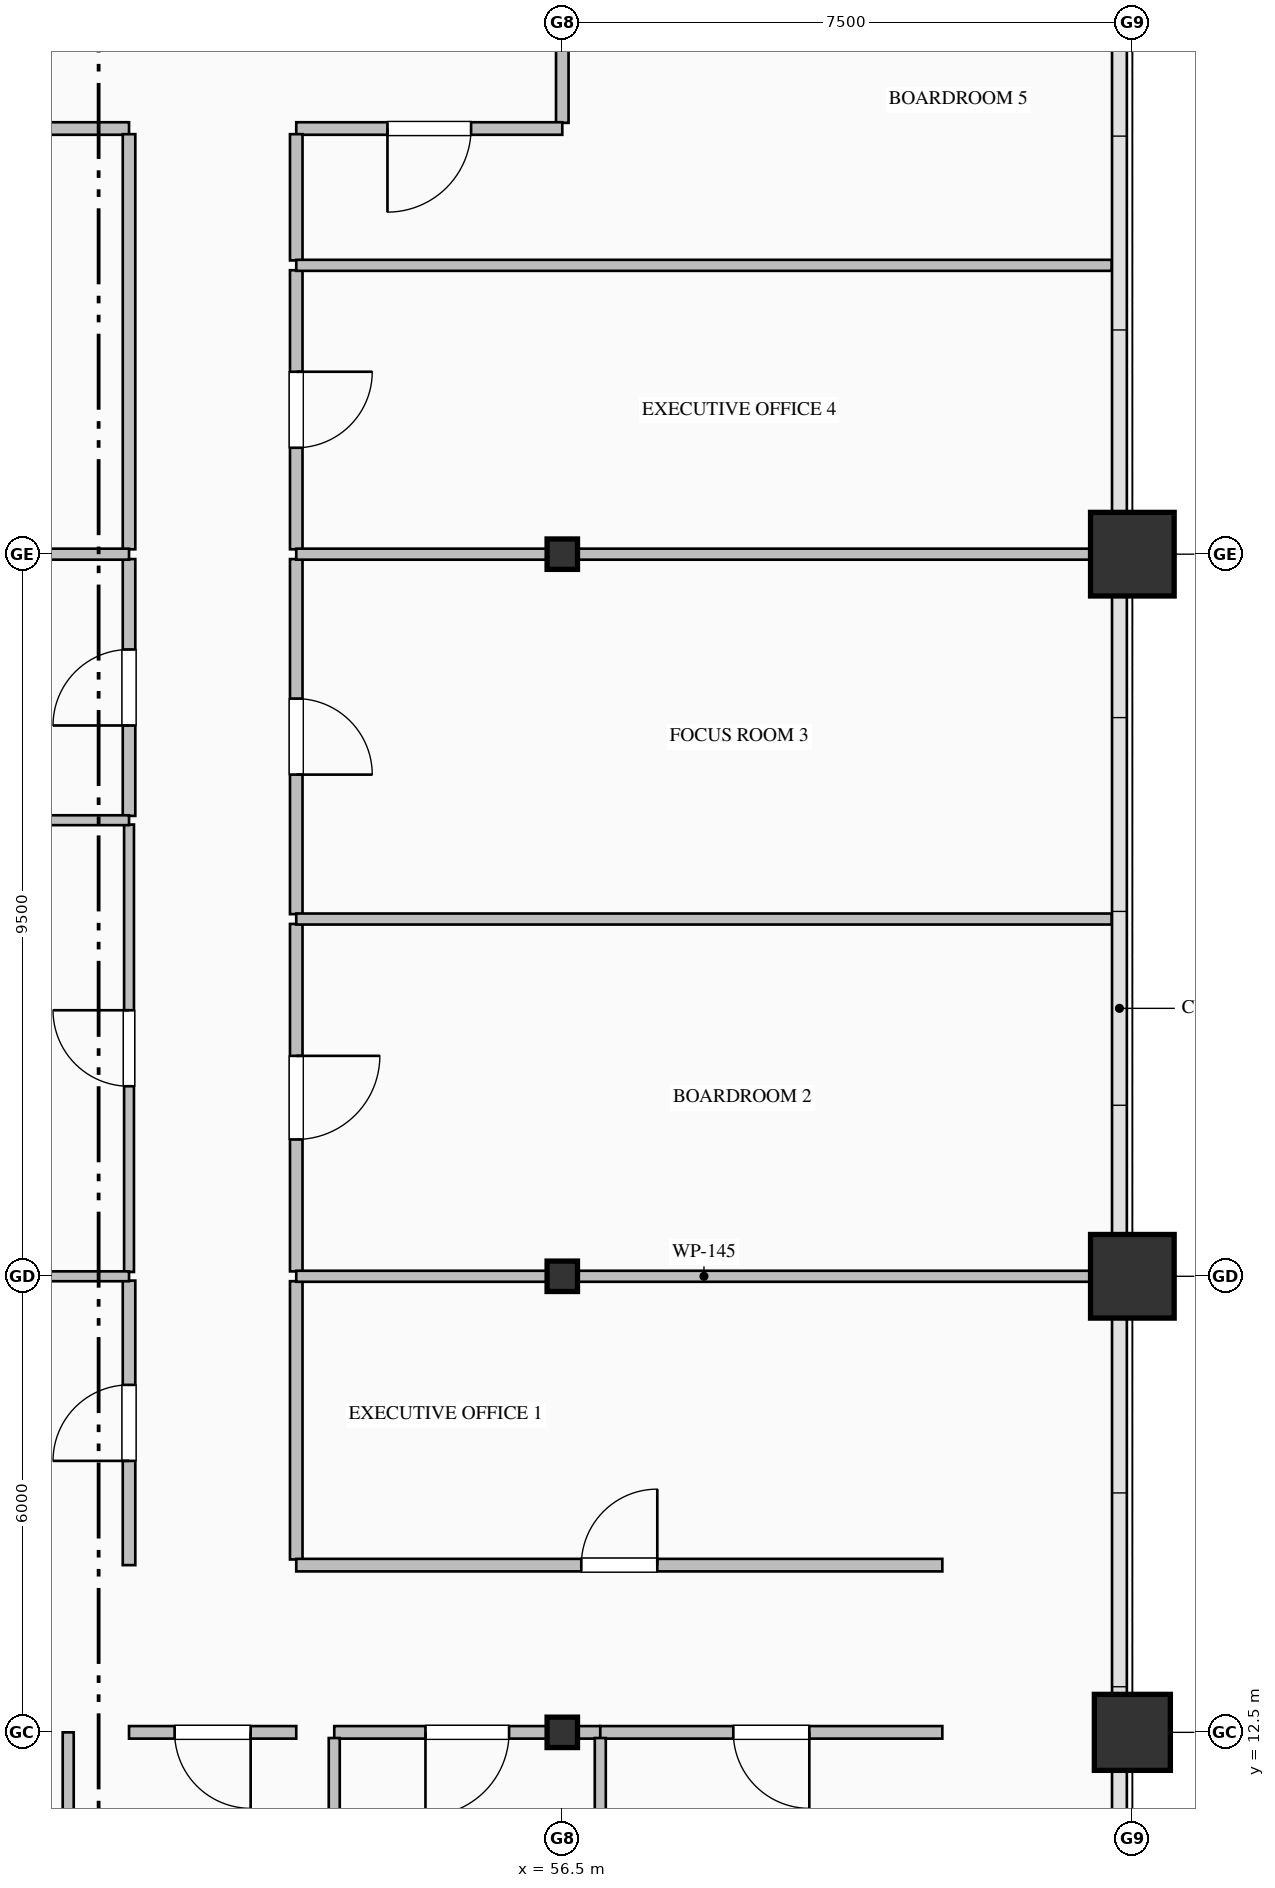
"""IFC4 building model, lengths in metres.
Left out: names, types, materials, properties, quantities, classifications, styles, units other than length and angle.
Written with IfcOpenShell. Run it as: python <this file> out.ifc"""

import sys

from ifc_helpers import new_model, si_unit, direction, frame, frame_2d, origin, origin_2d, place, context, subcontext, project, spatial, rectangle, hollow_rectangle, hollow_circle, i_section, extrude, element, fill, save


model = new_model("IFC4")
c1 = context("Model", 3, precision=1e-05, world=origin(), true_north=direction((0.0, 1.0)))
c2 = subcontext(c1, "Body", "Model", "MODEL_VIEW")
j1 = project(units=[si_unit("LENGTHUNIT", "METRE"), si_unit("PLANEANGLEUNIT", "RADIAN")], contexts=[c1])
p1 = place(None, origin())
s1 = spatial("IfcSite", under=j1, at=p1, CompositionType="ELEMENT")
p2 = place(p1, origin())
s2 = spatial("IfcBuilding", under=s1, at=p2, CompositionType="ELEMENT")
p3 = place(p2, frame((0.0, 0.0, 119.0)))
s3 = spatial("IfcBuildingStorey", under=s2, at=p3, CompositionType="ELEMENT", Elevation=119.0)
for number, where, z_axis, x_axis in (
    (1, (56.5, 12.5, 0.0), (0.0, 0.0, 1.0), (1.0, 0.0, 0.0)),
    (2, (56.5, 18.5, 0.0), (0.0, 0.0, 1.0), (1.0, 0.0, 0.0)),
    (3, (56.5, 28.0, 0.0), (0.0, 0.0, 1.0), (1.0, 0.0, 0.0)),
):
    element("IfcColumn", number, at=place(p3, frame(where, z_axis=z_axis, x_axis=x_axis)), inside=s3, PredefinedType="COLUMN", context=c2, shape_type="SweptSolid", body=[
        extrude(i_section(OverallWidth=0.4, OverallDepth=0.4, WebThickness=0.013, FlangeThickness=0.021, FilletRadius=0.022, at=origin_2d()), origin(), (0.0, 0.0, 1.0), 4.0),
    ])
p4 = place(p3, frame((64.0, 12.5, 0.0), z_axis=(0.0, 0.0, 1.0), x_axis=(1.0, 0.0, 0.0)))
e4 = element("IfcColumn", 4, at=p4, inside=s3, PredefinedType="COLUMN", context=c2, shape_type="SweptSolid", body=[
    extrude(hollow_circle(Radius=0.5, WallThickness=0.036, at=origin_2d()), origin(), (0.0, 0.0, 1.0), 4.0),
])
for number, where, z_axis, x_axis in (
    (5, (64.0, 18.5, 0.0), (0.0, 0.0, 1.0), (1.0, 0.0, 0.0)),
    (6, (64.0, 28.0, 0.0), (0.0, 0.0, 1.0), (1.0, 0.0, 0.0)),
):
    element("IfcColumn", number, at=place(p3, frame(where, z_axis=z_axis, x_axis=x_axis)), inside=s3, PredefinedType="COLUMN", context=c2, shape_type="SweptSolid", body=[
        extrude(hollow_rectangle(XDim=1.1, YDim=1.1, WallThickness=0.04, at=origin_2d()), origin(), (0.0, 0.0, 1.0), 4.0),
    ])
p5 = place(p3, frame((56.5, 36.0, 0.0), z_axis=(0.0, 0.0, 1.0), x_axis=(0.0, -1.0, 0.0)))
e7 = element("IfcWall", 7, at=p5, inside=s3, PredefinedType="PARTITIONING", context=c2, shape_type="SweptSolid", body=[
    extrude(rectangle(XDim=2.325, YDim=0.165, at=frame_2d((1.163, 0.0))), origin(), (0.0, 0.0, 1.0), 3.157),
])
p6 = place(p3, frame((56.5, 33.6, 0.0), z_axis=(0.0, 0.0, 1.0), x_axis=(-1.0, 0.0, 0.0)))
e8 = element("IfcWall", 8, at=p6, inside=s3, PredefinedType="PARTITIONING", context=c2, shape_type="SweptSolid", body=[
    extrude(rectangle(XDim=3.5, YDim=0.165, at=frame_2d((1.75, 0.0))), origin(), (0.0, 0.0, 1.0), 3.765),
])
p7 = place(p6, frame((1.2, 0.0, 0.0)))
e9 = element("IfcOpeningElement", 9, at=p7, cuts=e8, PredefinedType="OPENING", context=c2, shape_type="SweptSolid", body=[
    extrude(rectangle(XDim=1.1, YDim=2.2, at=frame_2d((0.55, 1.1))), frame((0.0, 0.093, 0.0), z_axis=(0.0, -1.0, 0.0), x_axis=(1.0, 0.0, 0.0)), (0.0, 0.0, 1.0), 0.185),
])
p8 = place(p3, frame((50.8, 33.6, 0.0), z_axis=(0.0, 0.0, 1.0), x_axis=(-1.0, 0.0, 0.0)))
e10 = element("IfcWall", 10, at=p8, inside=s3, PredefinedType="PARTITIONING", context=c2, shape_type="SweptSolid", body=[
    extrude(rectangle(XDim=10.3, YDim=0.165, at=frame_2d((5.15, 0.0))), origin(), (0.0, 0.0, 1.0), 3.765),
])
p9 = place(p8, frame((4.65, 0.0, 0.0)))
e11 = element("IfcOpeningElement", 11, at=p9, cuts=e10, PredefinedType="OPENING", context=c2, shape_type="SweptSolid", body=[
    extrude(rectangle(XDim=1.0, YDim=2.15, at=frame_2d((0.5, 1.075))), frame((0.0, 0.093, 0.0), z_axis=(0.0, -1.0, 0.0), x_axis=(1.0, 0.0, 0.0)), (0.0, 0.0, 1.0), 0.185),
])
p10 = place(p3, frame((53.0, 18.436, 0.0), z_axis=(0.0, 0.0, 1.0), x_axis=(0.0, -1.0, 0.0)))
e12 = element("IfcWall", 12, at=p10, inside=s3, PredefinedType="PARTITIONING", context=c2, shape_type="SweptSolid", body=[
    extrude(rectangle(XDim=3.661, YDim=0.165, at=frame_2d((1.831, 0.0))), origin(), (0.0, 0.0, 1.0), 3.765),
])
p11 = place(p3, frame((53.0, 23.135, 0.0), z_axis=(0.0, 0.0, 1.0), x_axis=(0.0, -1.0, 0.0)))
e13 = element("IfcWall", 13, at=p11, inside=s3, PredefinedType="PARTITIONING", context=c2, shape_type="SweptSolid", body=[
    extrude(rectangle(XDim=4.571, YDim=0.165, at=frame_2d((2.286, 0.0))), origin(), (0.0, 0.0, 1.0), 3.765),
])
p12 = place(p11, frame((1.736, 0.0, 0.0)))
e14 = element("IfcOpeningElement", 14, at=p12, cuts=e13, PredefinedType="OPENING", context=c2, shape_type="SweptSolid", body=[
    extrude(rectangle(XDim=1.1, YDim=2.2, at=frame_2d((0.55, 1.1))), frame((0.0, 0.093, 0.0), z_axis=(0.0, -1.0, 0.0), x_axis=(1.0, 0.0, 0.0)), (0.0, 0.0, 1.0), 0.185),
])
p13 = place(p3, frame((53.0, 27.936, 0.0), z_axis=(0.0, 0.0, 1.0), x_axis=(0.0, -1.0, 0.0)))
e15 = element("IfcWall", 15, at=p13, inside=s3, PredefinedType="PARTITIONING", context=c2, shape_type="SweptSolid", body=[
    extrude(rectangle(XDim=4.671, YDim=0.165, at=frame_2d((2.335, 0.0))), origin(), (0.0, 0.0, 1.0), 3.765),
])
p14 = place(p13, frame((1.835, 0.0, 0.0)))
e16 = element("IfcOpeningElement", 16, at=p14, cuts=e15, PredefinedType="OPENING", context=c2, shape_type="SweptSolid", body=[
    extrude(rectangle(XDim=1.0, YDim=2.15, at=frame_2d((0.5, 1.075))), frame((0.0, 0.093, 0.0), z_axis=(0.0, -1.0, 0.0), x_axis=(1.0, 0.0, 0.0)), (0.0, 0.0, 1.0), 0.185),
])
p15 = place(p3, frame((53.0, 31.736, 0.0), z_axis=(0.0, 0.0, 1.0), x_axis=(0.0, -1.0, 0.0)))
e17 = element("IfcWall", 17, at=p15, inside=s3, PredefinedType="PARTITIONING", context=c2, shape_type="SweptSolid", body=[
    extrude(rectangle(XDim=3.671, YDim=0.165, at=frame_2d((1.835, 0.0))), origin(), (0.0, 0.0, 1.0), 3.765),
])
p16 = place(p15, frame((1.335, 0.0, 0.0)))
e18 = element("IfcOpeningElement", 18, at=p16, cuts=e17, PredefinedType="OPENING", context=c2, shape_type="SweptSolid", body=[
    extrude(rectangle(XDim=1.0, YDim=2.15, at=frame_2d((0.5, 1.075))), frame((0.0, 0.093, 0.0), z_axis=(0.0, -1.0, 0.0), x_axis=(1.0, 0.0, 0.0)), (0.0, 0.0, 1.0), 0.185),
])
p17 = place(p3, frame((53.0, 33.525, 0.0), z_axis=(0.0, 0.0, 1.0), x_axis=(0.0, -1.0, 0.0)))
e19 = element("IfcWall", 19, at=p17, inside=s3, PredefinedType="PARTITIONING", context=c2, shape_type="SweptSolid", body=[
    extrude(rectangle(XDim=1.661, YDim=0.165, at=frame_2d((0.831, 0.0))), origin(), (0.0, 0.0, 1.0), 3.765),
])
p18 = place(p3, frame((50.8, 14.7, 0.0), z_axis=(0.0, 0.0, 1.0), x_axis=(0.0, 1.0, 0.0)))
e20 = element("IfcWall", 20, at=p18, inside=s3, PredefinedType="PARTITIONING", context=c2, shape_type="SweptSolid", body=[
    extrude(rectangle(XDim=3.743, YDim=0.165, at=frame_2d((1.872, 0.0))), origin(), (0.0, 0.0, 1.0), 3.765),
])
p19 = place(p18, frame((1.372, 0.0, 0.0)))
e21 = element("IfcOpeningElement", 21, at=p19, cuts=e20, PredefinedType="OPENING", context=c2, shape_type="SweptSolid", body=[
    extrude(rectangle(XDim=1.0, YDim=2.15, at=frame_2d((0.5, 1.075))), frame((0.0, 0.093, 0.0), z_axis=(0.0, -1.0, 0.0), x_axis=(1.0, 0.0, 0.0)), (0.0, 0.0, 1.0), 0.185),
])
p20 = place(p3, frame((50.8, 18.557, 0.0), z_axis=(0.0, 0.0, 1.0), x_axis=(0.0, 1.0, 0.0)))
e22 = element("IfcWall", 22, at=p20, inside=s3, PredefinedType="PARTITIONING", context=c2, shape_type="SweptSolid", body=[
    extrude(rectangle(XDim=5.886, YDim=0.13, at=frame_2d((2.943, 0.0))), origin(), (0.0, 0.0, 1.0), 3.765),
])
p21 = place(p20, frame((2.443, 0.0, 0.0)))
e23 = element("IfcOpeningElement", 23, at=p21, cuts=e22, PredefinedType="OPENING", context=c2, shape_type="SweptSolid", body=[
    extrude(rectangle(XDim=1.0, YDim=2.15, at=frame_2d((0.5, 1.075))), frame((0.0, 0.075, 0.0), z_axis=(0.0, -1.0, 0.0), x_axis=(1.0, 0.0, 0.0)), (0.0, 0.0, 1.0), 0.15),
])
p22 = place(p3, frame((50.8, 24.557, 0.0), z_axis=(0.0, 0.0, 1.0), x_axis=(0.0, 1.0, 0.0)))
e24 = element("IfcWall", 24, at=p22, inside=s3, PredefinedType="PARTITIONING", context=c2, shape_type="SweptSolid", body=[
    extrude(rectangle(XDim=3.379, YDim=0.165, at=frame_2d((1.689, 0.0))), origin(), (0.0, 0.0, 1.0), 3.765),
])
p23 = place(p22, frame((1.189, 0.0, 0.0)))
e25 = element("IfcOpeningElement", 25, at=p23, cuts=e24, PredefinedType="OPENING", context=c2, shape_type="SweptSolid", body=[
    extrude(rectangle(XDim=1.0, YDim=2.15, at=frame_2d((0.5, 1.075))), frame((0.0, 0.093, 0.0), z_axis=(0.0, -1.0, 0.0), x_axis=(1.0, 0.0, 0.0)), (0.0, 0.0, 1.0), 0.185),
])
p24 = place(p3, frame((50.8, 28.064, 0.0), z_axis=(0.0, 0.0, 1.0), x_axis=(0.0, 1.0, 0.0)))
e26 = element("IfcWall", 26, at=p24, inside=s3, PredefinedType="PARTITIONING", context=c2, shape_type="SweptSolid", body=[
    extrude(rectangle(XDim=5.461, YDim=0.165, at=frame_2d((2.73, 0.0))), origin(), (0.0, 0.0, 1.0), 3.765),
])
p25 = place(p3, frame((53.0, 12.5, 0.0), z_axis=(0.0, 0.0, 1.0), x_axis=(-1.0, 0.0, 0.0)))
e27 = element("IfcWall", 27, at=p25, inside=s3, PredefinedType="PARTITIONING", context=c2, shape_type="SweptSolid", body=[
    extrude(rectangle(XDim=2.2, YDim=0.165, at=frame_2d((1.1, 0.0))), origin(), (0.0, 0.0, 1.0), 3.157),
])
p26 = place(p25, frame((0.6, 0.0, 0.0)))
e28 = element("IfcOpeningElement", 28, at=p26, cuts=e27, PredefinedType="OPENING", context=c2, shape_type="SweptSolid", body=[
    extrude(rectangle(XDim=1.0, YDim=2.15, at=frame_2d((0.5, 1.075))), frame((0.0, 0.093, 0.0), z_axis=(0.0, -1.0, 0.0), x_axis=(1.0, 0.0, 0.0)), (0.0, 0.0, 1.0), 0.185),
])
p27 = place(p3, frame((53.0, 14.7, 0.0), z_axis=(0.0, 0.0, 1.0), x_axis=(1.0, 0.0, 0.0)))
e29 = element("IfcWall", 29, at=p27, inside=s3, PredefinedType="PARTITIONING", context=c2, shape_type="SweptSolid", body=[
    extrude(rectangle(XDim=8.5, YDim=0.165, at=frame_2d((4.25, 0.0))), origin(), (0.0, 0.0, 1.0), 3.765),
])
p28 = place(p27, frame((3.75, 0.0, 0.0)))
e30 = element("IfcOpeningElement", 30, at=p28, cuts=e29, PredefinedType="OPENING", context=c2, shape_type="SweptSolid", body=[
    extrude(rectangle(XDim=1.0, YDim=2.15, at=frame_2d((0.5, 1.075))), frame((0.0, 0.093, 0.0), z_axis=(0.0, -1.0, 0.0), x_axis=(1.0, 0.0, 0.0)), (0.0, 0.0, 1.0), 0.185),
])
p29 = place(p3, frame((57.0, 12.5, 0.0), z_axis=(0.0, 0.0, 1.0), x_axis=(-1.0, 0.0, 0.0)))
e31 = element("IfcWall", 31, at=p29, inside=s3, PredefinedType="PARTITIONING", context=c2, shape_type="SweptSolid", body=[
    extrude(rectangle(XDim=3.5, YDim=0.165, at=frame_2d((1.75, 0.0))), origin(), (0.0, 0.0, 1.0), 3.157),
])
p30 = place(p29, frame((1.2, 0.0, 0.0)))
e32 = element("IfcOpeningElement", 32, at=p30, cuts=e31, PredefinedType="OPENING", context=c2, shape_type="SweptSolid", body=[
    extrude(rectangle(XDim=1.1, YDim=2.2, at=frame_2d((0.55, 1.1))), frame((0.0, 0.093, 0.0), z_axis=(0.0, -1.0, 0.0), x_axis=(1.0, 0.0, 0.0)), (0.0, 0.0, 1.0), 0.185),
])
p31 = place(p3, frame((61.5, 12.5, 0.0), z_axis=(0.0, 0.0, 1.0), x_axis=(-1.0, 0.0, 0.0)))
e33 = element("IfcWall", 33, at=p31, inside=s3, PredefinedType="PARTITIONING", context=c2, shape_type="SweptSolid", body=[
    extrude(rectangle(XDim=4.5, YDim=0.165, at=frame_2d((2.25, 0.0))), origin(), (0.0, 0.0, 1.0), 3.157),
])
p32 = place(p31, frame((1.75, 0.0, 0.0)))
e34 = element("IfcOpeningElement", 34, at=p32, cuts=e33, PredefinedType="OPENING", context=c2, shape_type="SweptSolid", body=[
    extrude(rectangle(XDim=1.0, YDim=2.15, at=frame_2d((0.5, 1.075))), frame((0.0, 0.093, 0.0), z_axis=(0.0, -1.0, 0.0), x_axis=(1.0, 0.0, 0.0)), (0.0, 0.0, 1.0), 0.185),
])
p33 = place(p3, frame((53.0, 18.5, 0.0), z_axis=(0.0, 0.0, 1.0), x_axis=(1.0, 0.0, 0.0)))
e35 = element("IfcWall", 35, at=p33, inside=s3, PredefinedType="PARTITIONING", context=c2, shape_type="SweptSolid", body=[
    extrude(rectangle(XDim=10.728, YDim=0.145, at=frame_2d((5.364, 0.0))), origin(), (0.0, 0.0, 1.0), 3.157),
])
p34 = place(p3, frame((53.0, 23.2, 0.0), z_axis=(0.0, 0.0, 1.0), x_axis=(1.0, 0.0, 0.0)))
e36 = element("IfcWall", 36, at=p34, inside=s3, PredefinedType="PARTITIONING", context=c2, shape_type="SweptSolid", body=[
    extrude(rectangle(XDim=10.728, YDim=0.145, at=frame_2d((5.364, 0.0))), origin(), (0.0, 0.0, 1.0), 3.407),
])
p35 = place(p3, frame((53.0, 28.0, 0.0), z_axis=(0.0, 0.0, 1.0), x_axis=(1.0, 0.0, 0.0)))
e37 = element("IfcWall", 37, at=p35, inside=s3, PredefinedType="PARTITIONING", context=c2, shape_type="SweptSolid", body=[
    extrude(rectangle(XDim=10.728, YDim=0.145, at=frame_2d((5.364, 0.0))), origin(), (0.0, 0.0, 1.0), 3.157),
])
p36 = place(p3, frame((53.0, 31.8, 0.0), z_axis=(0.0, 0.0, 1.0), x_axis=(1.0, 0.0, 0.0)))
e38 = element("IfcWall", 38, at=p36, inside=s3, PredefinedType="PARTITIONING", context=c2, shape_type="SweptSolid", body=[
    extrude(rectangle(XDim=10.728, YDim=0.145, at=frame_2d((5.364, 0.0))), origin(), (0.0, 0.0, 1.0), 3.765),
])
p37 = place(p3, frame((40.832, 18.5, 0.0), z_axis=(0.0, 0.0, 1.0), x_axis=(1.0, 0.0, 0.0)))
e39 = element("IfcWall", 39, at=p37, inside=s3, PredefinedType="PARTITIONING", context=c2, shape_type="SweptSolid", body=[
    extrude(rectangle(XDim=9.968, YDim=0.13, at=frame_2d((4.984, 0.0))), origin(), (0.0, 0.0, 1.0), 3.157),
])
p38 = place(p3, frame((40.832, 24.5, 0.0), z_axis=(0.0, 0.0, 1.0), x_axis=(1.0, 0.0, 0.0)))
e40 = element("IfcWall", 40, at=p38, inside=s3, PredefinedType="PARTITIONING", context=c2, shape_type="SweptSolid", body=[
    extrude(rectangle(XDim=9.968, YDim=0.13, at=frame_2d((4.984, 0.0))), origin(), (0.0, 0.0, 1.0), 3.765),
])
p39 = place(p3, frame((40.832, 28.0, 0.0), z_axis=(0.0, 0.0, 1.0), x_axis=(1.0, 0.0, 0.0)))
e41 = element("IfcWall", 41, at=p39, inside=s3, PredefinedType="PARTITIONING", context=c2, shape_type="SweptSolid", body=[
    extrude(rectangle(XDim=9.968, YDim=0.145, at=frame_2d((4.984, 0.0))), origin(), (0.0, 0.0, 1.0), 3.157),
])
p40 = place(p3, frame((50.0, 12.5, 0.0), z_axis=(0.0, 0.0, 1.0), x_axis=(0.0, -1.0, 0.0)))
e42 = element("IfcWall", 42, at=p40, inside=s3, PredefinedType="PARTITIONING", context=c2, shape_type="SweptSolid", body=[
    extrude(rectangle(XDim=8.168, YDim=0.145, at=frame_2d((4.084, 0.0))), origin(), (0.0, 0.0, 1.0), 3.765),
])
p41 = place(p40, frame((3.534, 0.0, 0.0)))
e43 = element("IfcOpeningElement", 43, at=p41, cuts=e42, PredefinedType="OPENING", context=c2, shape_type="SweptSolid", body=[
    extrude(rectangle(XDim=1.1, YDim=2.2, at=frame_2d((0.55, 1.1))), frame((0.0, 0.083, 0.0), z_axis=(0.0, -1.0, 0.0), x_axis=(1.0, 0.0, 0.0)), (0.0, 0.0, 1.0), 0.165),
])
for number, where, z_axis, x_axis in (
    (44, (53.5, 12.426, 0.0), (0.0, 0.0, 1.0), (0.0, -1.0, 0.0)),
    (45, (57.0, 12.426, 0.0), (0.0, 0.0, 1.0), (0.0, -1.0, 0.0)),
):
    element("IfcWall", number, at=place(p3, frame(where, z_axis=z_axis, x_axis=x_axis)), inside=s3, PredefinedType="PARTITIONING", context=c2, shape_type="SweptSolid", body=[
        extrude(rectangle(XDim=8.094, YDim=0.145, at=frame_2d((4.047, 0.0))), origin(), (0.0, 0.0, 1.0), 3.765),
    ])
p42 = place(p28, origin())
e46 = element("IfcDoor", 46, at=p42, inside=s3, OperationType="SINGLE_SWING_RIGHT", PredefinedType="DOOR", context=c2, shape_type="SweptSolid", body=[
    extrude(rectangle(XDim=1.0, YDim=2.15, at=frame_2d((0.5, 1.075))), frame((0.0, 0.025, 0.0), z_axis=(0.0, -1.0, 0.0), x_axis=(1.0, 0.0, 0.0)), (0.0, 0.0, 1.0), 0.05),
])
fill(e30, e46)
p43 = place(p12, origin())
e47 = element("IfcDoor", 47, at=p43, inside=s3, OperationType="SINGLE_SWING_LEFT", PredefinedType="DOOR", context=c2, shape_type="SweptSolid", body=[
    extrude(rectangle(XDim=1.1, YDim=2.2, at=frame_2d((0.55, 1.1))), frame((0.0, 0.025, 0.0), z_axis=(0.0, -1.0, 0.0), x_axis=(1.0, 0.0, 0.0)), (0.0, 0.0, 1.0), 0.05),
])
fill(e14, e47)
p44 = place(p14, origin())
e48 = element("IfcDoor", 48, at=p44, inside=s3, OperationType="SINGLE_SWING_RIGHT", PredefinedType="DOOR", context=c2, shape_type="SweptSolid", body=[
    extrude(rectangle(XDim=1.0, YDim=2.15, at=frame_2d((0.5, 1.075))), frame((0.0, 0.025, 0.0), z_axis=(0.0, -1.0, 0.0), x_axis=(1.0, 0.0, 0.0)), (0.0, 0.0, 1.0), 0.05),
])
fill(e16, e48)
p45 = place(p16, origin())
e49 = element("IfcDoor", 49, at=p45, inside=s3, OperationType="SINGLE_SWING_LEFT", PredefinedType="DOOR", context=c2, shape_type="SweptSolid", body=[
    extrude(rectangle(XDim=1.0, YDim=2.15, at=frame_2d((0.5, 1.075))), frame((0.0, 0.025, 0.0), z_axis=(0.0, -1.0, 0.0), x_axis=(1.0, 0.0, 0.0)), (0.0, 0.0, 1.0), 0.05),
])
fill(e18, e49)
p46 = place(p7, origin())
e50 = element("IfcDoor", 50, at=p46, inside=s3, OperationType="SINGLE_SWING_RIGHT", PredefinedType="DOOR", context=c2, shape_type="SweptSolid", body=[
    extrude(rectangle(XDim=1.1, YDim=2.2, at=frame_2d((0.55, 1.1))), frame((0.0, 0.025, 0.0), z_axis=(0.0, -1.0, 0.0), x_axis=(1.0, 0.0, 0.0)), (0.0, 0.0, 1.0), 0.05),
])
fill(e9, e50)
p47 = place(p19, origin())
e51 = element("IfcDoor", 51, at=p47, inside=s3, OperationType="SINGLE_SWING_LEFT", PredefinedType="DOOR", context=c2, shape_type="SweptSolid", body=[
    extrude(rectangle(XDim=1.0, YDim=2.15, at=frame_2d((0.5, 1.075))), frame((0.0, 0.025, 0.0), z_axis=(0.0, -1.0, 0.0), x_axis=(1.0, 0.0, 0.0)), (0.0, 0.0, 1.0), 0.05),
])
fill(e21, e51)
p48 = place(p21, origin())
e52 = element("IfcDoor", 52, at=p48, inside=s3, OperationType="SINGLE_SWING_RIGHT", PredefinedType="DOOR", context=c2, shape_type="SweptSolid", body=[
    extrude(rectangle(XDim=1.0, YDim=2.15, at=frame_2d((0.5, 1.075))), frame((0.0, 0.025, 0.0), z_axis=(0.0, -1.0, 0.0), x_axis=(1.0, 0.0, 0.0)), (0.0, 0.0, 1.0), 0.05),
])
fill(e23, e52)
p49 = place(p23, origin())
e53 = element("IfcDoor", 53, at=p49, inside=s3, OperationType="SINGLE_SWING_LEFT", PredefinedType="DOOR", context=c2, shape_type="SweptSolid", body=[
    extrude(rectangle(XDim=1.0, YDim=2.15, at=frame_2d((0.5, 1.075))), frame((0.0, 0.025, 0.0), z_axis=(0.0, -1.0, 0.0), x_axis=(1.0, 0.0, 0.0)), (0.0, 0.0, 1.0), 0.05),
])
fill(e25, e53)
p50 = place(p26, origin())
e54 = element("IfcDoor", 54, at=p50, inside=s3, OperationType="SINGLE_SWING_LEFT", PredefinedType="DOOR", context=c2, shape_type="SweptSolid", body=[
    extrude(rectangle(XDim=1.0, YDim=2.15, at=frame_2d((0.5, 1.075))), frame((0.0, 0.025, 0.0), z_axis=(0.0, -1.0, 0.0), x_axis=(1.0, 0.0, 0.0)), (0.0, 0.0, 1.0), 0.05),
])
fill(e28, e54)
p51 = place(p30, origin())
e55 = element("IfcDoor", 55, at=p51, inside=s3, OperationType="SINGLE_SWING_RIGHT", PredefinedType="DOOR", context=c2, shape_type="SweptSolid", body=[
    extrude(rectangle(XDim=1.1, YDim=2.2, at=frame_2d((0.55, 1.1))), frame((0.0, 0.025, 0.0), z_axis=(0.0, -1.0, 0.0), x_axis=(1.0, 0.0, 0.0)), (0.0, 0.0, 1.0), 0.05),
])
fill(e32, e55)
p52 = place(p32, origin())
e56 = element("IfcDoor", 56, at=p52, inside=s3, OperationType="SINGLE_SWING_LEFT", PredefinedType="DOOR", context=c2, shape_type="SweptSolid", body=[
    extrude(rectangle(XDim=1.0, YDim=2.15, at=frame_2d((0.5, 1.075))), frame((0.0, 0.025, 0.0), z_axis=(0.0, -1.0, 0.0), x_axis=(1.0, 0.0, 0.0)), (0.0, 0.0, 1.0), 0.05),
])
fill(e34, e56)
save(model, sys.argv[1])
